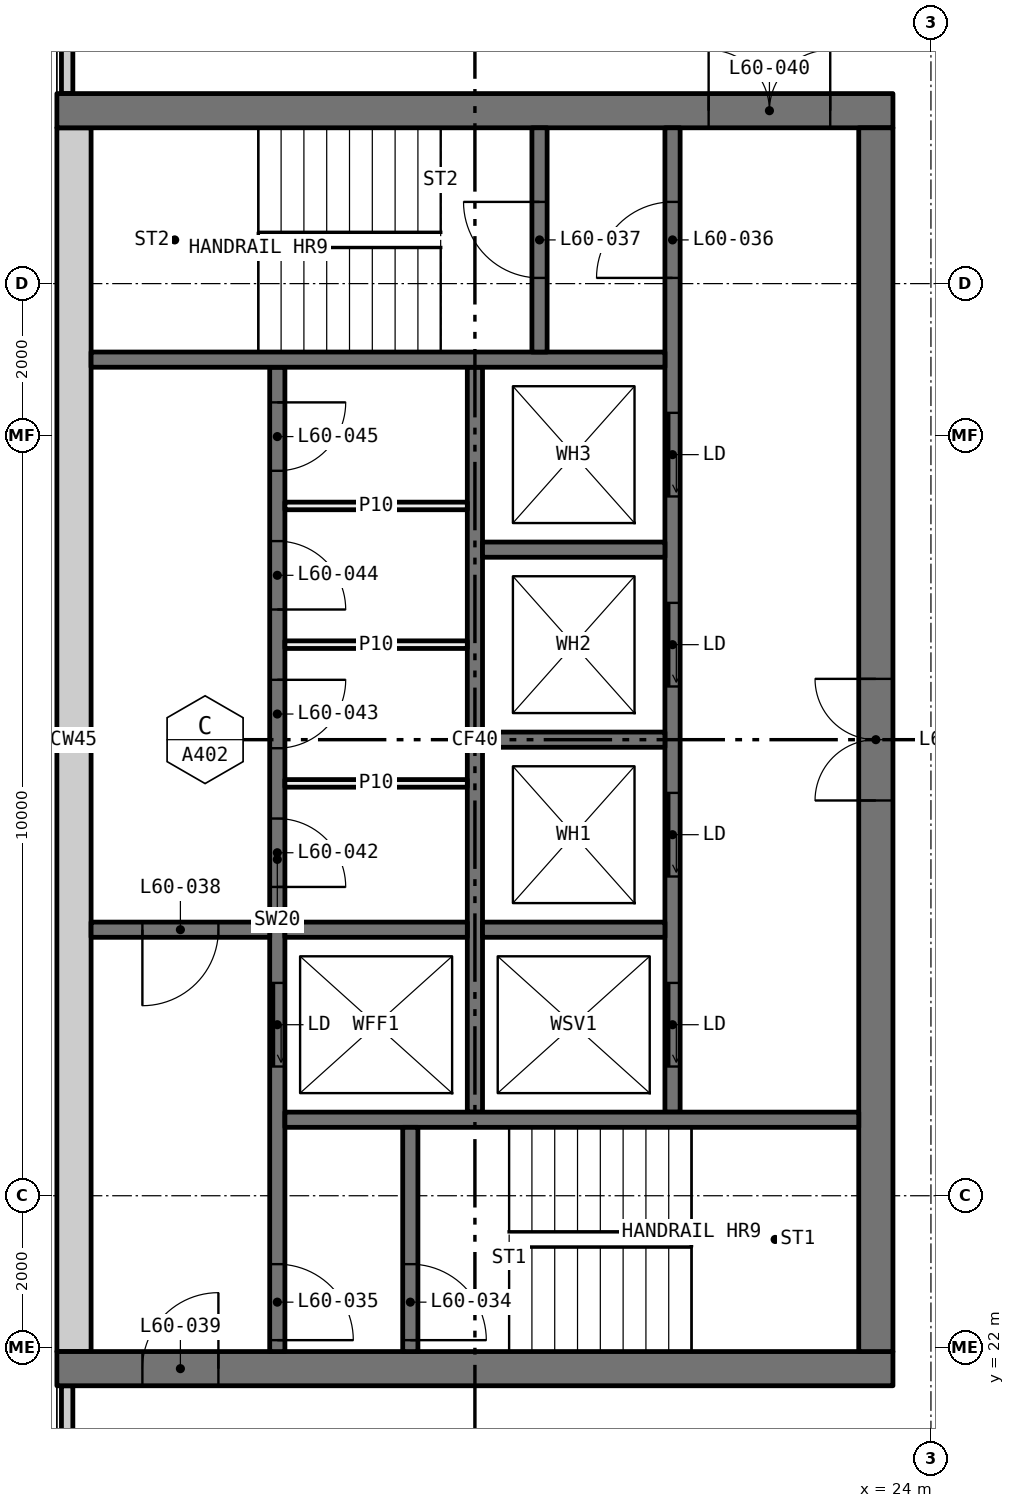
"""IFC4 building model, lengths in metres.
Left out: names, types, materials, properties, quantities, classifications, styles, units other than length and angle.
Written with IfcOpenShell. Run it as: python <this file> out.ifc"""

import sys

from ifc_helpers import new_model, si_unit, direction, frame, frame_2d, origin, place, context, subcontext, project, spatial, rectangle, extrude, element, fill, save


model = new_model("IFC4")
c1 = context("Model", 3, precision=1e-05, world=origin(), true_north=direction((0.0, 1.0)))
c2 = subcontext(c1, "Body", "Model", "MODEL_VIEW")
j1 = project(units=[si_unit("LENGTHUNIT", "METRE"), si_unit("PLANEANGLEUNIT", "RADIAN")], contexts=[c1])
p1 = place(None, origin())
s1 = spatial("IfcSite", under=j1, at=p1, CompositionType="ELEMENT")
p2 = place(p1, origin())
s2 = spatial("IfcBuilding", under=s1, at=p2, CompositionType="ELEMENT")
p3 = place(p2, frame((0.0, 0.0, 224.85)))
s3 = spatial("IfcBuildingStorey", under=s2, at=p3, CompositionType="ELEMENT", Elevation=224.85)
for number, where, z_axis, x_axis in (
    (1, (12.635, 18.71, 0.0), (0.0, 0.0, 1.0), (0.0, 1.0, 0.0)),
    (2, (12.635, 38.5, 0.0), (0.0, 0.0, 1.0), (0.0, 1.0, 0.0)),
):
    element("IfcWall", number, at=place(p3, frame(where, z_axis=z_axis, x_axis=x_axis)), inside=s3, PredefinedType="ELEMENTEDWALL", context=c2, shape_type="SweptSolid", body=[
        extrude(rectangle(XDim=2.79, YDim=0.15, at=frame_2d((1.395, 0.0))), origin(), (0.0, 0.0, 1.0), 3.05),
    ])
p4 = place(p3, frame((12.5, 21.725, 0.0), z_axis=(0.0, 0.0, 1.0), x_axis=(1.0, 0.0, 0.0)))
e3 = element("IfcWall", 3, at=p4, inside=s3, PredefinedType="SHEAR", context=c2, shape_type="SweptSolid", body=[
    extrude(rectangle(XDim=11.0, YDim=0.45, at=frame_2d((5.5, 0.0))), origin(), (0.0, 0.0, 1.0), 3.05),
])
p5 = place(p4, frame((1.125, 0.0, 0.0)))
e4 = element("IfcOpeningElement", 4, at=p5, cuts=e3, PredefinedType="OPENING", context=c2, shape_type="SweptSolid", body=[
    extrude(rectangle(XDim=1.0, YDim=2.1, at=frame_2d((0.5, 1.05))), frame((0.0, 0.235, 0.0), z_axis=(0.0, -1.0, 0.0), x_axis=(1.0, 0.0, 0.0)), (0.0, 0.0, 1.0), 0.47),
])
p6 = place(p3, frame((12.5, 38.275, 0.0), z_axis=(0.0, 0.0, 1.0), x_axis=(1.0, 0.0, 0.0)))
e5 = element("IfcWall", 5, at=p6, inside=s3, PredefinedType="SHEAR", context=c2, shape_type="SweptSolid", body=[
    extrude(rectangle(XDim=11.0, YDim=0.45, at=frame_2d((5.5, 0.0))), origin(), (0.0, 0.0, 1.0), 3.05),
])
p7 = place(p6, frame((8.575, 0.0, 0.0)))
e6 = element("IfcOpeningElement", 6, at=p7, cuts=e5, PredefinedType="OPENING", context=c2, shape_type="SweptSolid", body=[
    extrude(rectangle(XDim=1.6, YDim=2.1, at=frame_2d((0.8, 1.05))), frame((0.0, 0.235, 0.0), z_axis=(0.0, -1.0, 0.0), x_axis=(1.0, 0.0, 0.0)), (0.0, 0.0, 1.0), 0.47),
])
p8 = place(p3, frame((12.725, 21.95, 0.0), z_axis=(0.0, 0.0, 1.0), x_axis=(0.0, 1.0, 0.0)))
e7 = element("IfcWall", 7, at=p8, inside=s3, PredefinedType="SHEAR", context=c2, shape_type="SweptSolid", body=[
    extrude(rectangle(XDim=16.1, YDim=0.45, at=frame_2d((8.05, 0.0))), origin(), (0.0, 0.0, 1.0), 3.05),
])
p9 = place(p3, frame((23.275, 21.95, 0.0), z_axis=(0.0, 0.0, 1.0), x_axis=(0.0, 1.0, 0.0)))
e8 = element("IfcWall", 8, at=p9, inside=s3, PredefinedType="SHEAR", context=c2, shape_type="SweptSolid", body=[
    extrude(rectangle(XDim=16.1, YDim=0.45, at=frame_2d((8.05, 0.0))), origin(), (0.0, 0.0, 1.0), 3.05),
])
p10 = place(p9, frame((7.25, 0.0, 0.0)))
e9 = element("IfcOpeningElement", 9, at=p10, cuts=e8, PredefinedType="OPENING", context=c2, shape_type="SweptSolid", body=[
    extrude(rectangle(XDim=1.6, YDim=2.1, at=frame_2d((0.8, 1.05))), frame((0.0, 0.235, 0.0), z_axis=(0.0, -1.0, 0.0), x_axis=(1.0, 0.0, 0.0)), (0.0, 0.0, 1.0), 0.47),
])
p11 = place(p3, frame((15.4, 21.95, 0.0), z_axis=(0.0, 0.0, 1.0), x_axis=(0.0, 1.0, 0.0)))
e10 = element("IfcWall", 10, at=p11, inside=s3, PredefinedType="SOLIDWALL", context=c2, shape_type="SweptSolid", body=[
    extrude(rectangle(XDim=12.95, YDim=0.2, at=frame_2d((6.475, 0.0))), origin(), (0.0, 0.0, 1.0), 3.05),
])
p12 = place(p11, frame((3.75, 0.0, 0.0)))
e11 = element("IfcOpeningElement", 11, at=p12, cuts=e10, PredefinedType="OPENING", context=c2, shape_type="SweptSolid", body=[
    extrude(rectangle(XDim=1.1, YDim=2.1, at=frame_2d((0.55, 1.05))), frame((0.0, 0.11, 0.0), z_axis=(0.0, -1.0, 0.0), x_axis=(1.0, 0.0, 0.0)), (0.0, 0.0, 1.0), 0.22),
])
p13 = place(p11, frame((0.15, 0.0, 0.0)))
e12 = element("IfcOpeningElement", 12, at=p13, cuts=e10, PredefinedType="OPENING", context=c2, shape_type="SweptSolid", body=[
    extrude(rectangle(XDim=1.0, YDim=2.1, at=frame_2d((0.5, 1.05))), frame((0.0, 0.11, 0.0), z_axis=(0.0, -1.0, 0.0), x_axis=(1.0, 0.0, 0.0)), (0.0, 0.0, 1.0), 0.22),
])
p14 = place(p11, frame((6.113, 0.0, 0.0)))
e13 = element("IfcOpeningElement", 13, at=p14, cuts=e10, PredefinedType="OPENING", context=c2, shape_type="SweptSolid", body=[
    extrude(rectangle(XDim=0.9, YDim=2.1, at=frame_2d((0.45, 1.05))), frame((0.0, 0.11, 0.0), z_axis=(0.0, -1.0, 0.0), x_axis=(1.0, 0.0, 0.0)), (0.0, 0.0, 1.0), 0.22),
])
p15 = place(p11, frame((7.938, 0.0, 0.0)))
e14 = element("IfcOpeningElement", 14, at=p15, cuts=e10, PredefinedType="OPENING", context=c2, shape_type="SweptSolid", body=[
    extrude(rectangle(XDim=0.9, YDim=2.1, at=frame_2d((0.45, 1.05))), frame((0.0, 0.11, 0.0), z_axis=(0.0, -1.0, 0.0), x_axis=(1.0, 0.0, 0.0)), (0.0, 0.0, 1.0), 0.22),
])
p16 = place(p11, frame((9.762, 0.0, 0.0)))
e15 = element("IfcOpeningElement", 15, at=p16, cuts=e10, PredefinedType="OPENING", context=c2, shape_type="SweptSolid", body=[
    extrude(rectangle(XDim=0.9, YDim=2.1, at=frame_2d((0.45, 1.05))), frame((0.0, 0.11, 0.0), z_axis=(0.0, -1.0, 0.0), x_axis=(1.0, 0.0, 0.0)), (0.0, 0.0, 1.0), 0.22),
])
p17 = place(p11, frame((11.587, 0.0, 0.0)))
e16 = element("IfcOpeningElement", 16, at=p17, cuts=e10, PredefinedType="OPENING", context=c2, shape_type="SweptSolid", body=[
    extrude(rectangle(XDim=0.9, YDim=2.1, at=frame_2d((0.45, 1.05))), frame((0.0, 0.11, 0.0), z_axis=(0.0, -1.0, 0.0), x_axis=(1.0, 0.0, 0.0)), (0.0, 0.0, 1.0), 0.22),
])
p18 = place(p3, frame((20.6, 25.1, 0.0), z_axis=(0.0, 0.0, 1.0), x_axis=(0.0, 1.0, 0.0)))
e17 = element("IfcWall", 17, at=p18, inside=s3, PredefinedType="SOLIDWALL", context=c2, shape_type="SweptSolid", body=[
    extrude(rectangle(XDim=12.95, YDim=0.2, at=frame_2d((6.475, 0.0))), origin(), (0.0, 0.0, 1.0), 3.05),
])
p19 = place(p18, frame((0.6, 0.0, 0.0)))
e18 = element("IfcOpeningElement", 18, at=p19, cuts=e17, PredefinedType="OPENING", context=c2, shape_type="SweptSolid", body=[
    extrude(rectangle(XDim=1.1, YDim=2.1, at=frame_2d((0.55, 1.05))), frame((0.0, 0.11, 0.0), z_axis=(0.0, -1.0, 0.0), x_axis=(1.0, 0.0, 0.0)), (0.0, 0.0, 1.0), 0.22),
])
p20 = place(p18, frame((3.1, 0.0, 0.0)))
e19 = element("IfcOpeningElement", 19, at=p20, cuts=e17, PredefinedType="OPENING", context=c2, shape_type="SweptSolid", body=[
    extrude(rectangle(XDim=1.1, YDim=2.1, at=frame_2d((0.55, 1.05))), frame((0.0, 0.11, 0.0), z_axis=(0.0, -1.0, 0.0), x_axis=(1.0, 0.0, 0.0)), (0.0, 0.0, 1.0), 0.22),
])
p21 = place(p18, frame((5.6, 0.0, 0.0)))
e20 = element("IfcOpeningElement", 20, at=p21, cuts=e17, PredefinedType="OPENING", context=c2, shape_type="SweptSolid", body=[
    extrude(rectangle(XDim=1.1, YDim=2.1, at=frame_2d((0.55, 1.05))), frame((0.0, 0.11, 0.0), z_axis=(0.0, -1.0, 0.0), x_axis=(1.0, 0.0, 0.0)), (0.0, 0.0, 1.0), 0.22),
])
p22 = place(p18, frame((8.1, 0.0, 0.0)))
e21 = element("IfcOpeningElement", 21, at=p22, cuts=e17, PredefinedType="OPENING", context=c2, shape_type="SweptSolid", body=[
    extrude(rectangle(XDim=1.1, YDim=2.1, at=frame_2d((0.55, 1.05))), frame((0.0, 0.11, 0.0), z_axis=(0.0, -1.0, 0.0), x_axis=(1.0, 0.0, 0.0)), (0.0, 0.0, 1.0), 0.22),
])
p23 = place(p18, frame((10.975, 0.0, 0.0)))
e22 = element("IfcOpeningElement", 22, at=p23, cuts=e17, PredefinedType="OPENING", context=c2, shape_type="SweptSolid", body=[
    extrude(rectangle(XDim=1.0, YDim=2.1, at=frame_2d((0.5, 1.05))), frame((0.0, 0.11, 0.0), z_axis=(0.0, -1.0, 0.0), x_axis=(1.0, 0.0, 0.0)), (0.0, 0.0, 1.0), 0.22),
])
p24 = place(p3, frame((18.0, 25.1, 0.0), z_axis=(0.0, 0.0, 1.0), x_axis=(0.0, 1.0, 0.0)))
e23 = element("IfcWall", 23, at=p24, inside=s3, PredefinedType="SOLIDWALL", context=c2, shape_type="SweptSolid", body=[
    extrude(rectangle(XDim=9.8, YDim=0.2, at=frame_2d((4.9, 0.0))), origin(), (0.0, 0.0, 1.0), 3.05),
])
for number, where, z_axis, x_axis in (
    (24, (15.5, 25.0, 0.0), (0.0, 0.0, 1.0), (1.0, 0.0, 0.0)),
    (25, (12.95, 35.0, 0.0), (0.0, 0.0, 1.0), (1.0, 0.0, 0.0)),
):
    element("IfcWall", number, at=place(p3, frame(where, z_axis=z_axis, x_axis=x_axis)), inside=s3, PredefinedType="SOLIDWALL", context=c2, shape_type="SweptSolid", body=[
        extrude(rectangle(XDim=7.55, YDim=0.2, at=frame_2d((3.775, 0.0))), origin(), (0.0, 0.0, 1.0), 3.05),
    ])
p25 = place(p3, frame((12.95, 27.5, 0.0), z_axis=(0.0, 0.0, 1.0), x_axis=(1.0, 0.0, 0.0)))
e26 = element("IfcWall", 26, at=p25, inside=s3, PredefinedType="SOLIDWALL", context=c2, shape_type="SweptSolid", body=[
    extrude(rectangle(XDim=2.35, YDim=0.2, at=frame_2d((1.175, 0.0))), origin(), (0.0, 0.0, 1.0), 3.05),
])
p26 = place(p25, frame((0.675, 0.0, 0.0)))
e27 = element("IfcOpeningElement", 27, at=p26, cuts=e26, PredefinedType="OPENING", context=c2, shape_type="SweptSolid", body=[
    extrude(rectangle(XDim=1.0, YDim=2.1, at=frame_2d((0.5, 1.05))), frame((0.0, 0.11, 0.0), z_axis=(0.0, -1.0, 0.0), x_axis=(1.0, 0.0, 0.0)), (0.0, 0.0, 1.0), 0.22),
])
p27 = place(p3, frame((17.15, 21.95, 0.0), z_axis=(0.0, 0.0, 1.0), x_axis=(0.0, 1.0, 0.0)))
e28 = element("IfcWall", 28, at=p27, inside=s3, PredefinedType="SOLIDWALL", context=c2, shape_type="SweptSolid", body=[
    extrude(rectangle(XDim=2.95, YDim=0.2, at=frame_2d((1.475, 0.0))), origin(), (0.0, 0.0, 1.0), 3.05),
])
p28 = place(p27, frame((0.15, 0.0, 0.0)))
e29 = element("IfcOpeningElement", 29, at=p28, cuts=e28, PredefinedType="OPENING", context=c2, shape_type="SweptSolid", body=[
    extrude(rectangle(XDim=1.0, YDim=2.1, at=frame_2d((0.5, 1.05))), frame((0.0, 0.11, 0.0), z_axis=(0.0, -1.0, 0.0), x_axis=(1.0, 0.0, 0.0)), (0.0, 0.0, 1.0), 0.22),
])
p29 = place(p3, frame((18.85, 35.1, 0.0), z_axis=(0.0, 0.0, 1.0), x_axis=(0.0, 1.0, 0.0)))
e30 = element("IfcWall", 30, at=p29, inside=s3, PredefinedType="SOLIDWALL", context=c2, shape_type="SweptSolid", body=[
    extrude(rectangle(XDim=2.95, YDim=0.2, at=frame_2d((1.475, 0.0))), origin(), (0.0, 0.0, 1.0), 3.05),
])
p30 = place(p29, frame((0.975, 0.0, 0.0)))
e31 = element("IfcOpeningElement", 31, at=p30, cuts=e30, PredefinedType="OPENING", context=c2, shape_type="SweptSolid", body=[
    extrude(rectangle(XDim=1.0, YDim=2.1, at=frame_2d((0.5, 1.05))), frame((0.0, 0.11, 0.0), z_axis=(0.0, -1.0, 0.0), x_axis=(1.0, 0.0, 0.0)), (0.0, 0.0, 1.0), 0.22),
])
for number, where, z_axis, x_axis in (
    (32, (15.5, 27.5, 0.0), (0.0, 0.0, 1.0), (1.0, 0.0, 0.0)),
    (33, (18.1, 27.5, 0.0), (0.0, 0.0, 1.0), (1.0, 0.0, 0.0)),
    (34, (18.1, 30.0, 0.0), (0.0, 0.0, 1.0), (1.0, 0.0, 0.0)),
    (35, (18.1, 32.5, 0.0), (0.0, 0.0, 1.0), (1.0, 0.0, 0.0)),
):
    element("IfcWall", number, at=place(p3, frame(where, z_axis=z_axis, x_axis=x_axis)), inside=s3, PredefinedType="SOLIDWALL", context=c2, shape_type="SweptSolid", body=[
        extrude(rectangle(XDim=2.4, YDim=0.2, at=frame_2d((1.2, 0.0))), origin(), (0.0, 0.0, 1.0), 3.05),
    ])
for number, where, z_axis, x_axis in (
    (36, (15.5, 29.425, 0.0), (0.0, 0.0, 1.0), (1.0, 0.0, 0.0)),
    (37, (15.5, 31.25, 0.0), (0.0, 0.0, 1.0), (1.0, 0.0, 0.0)),
    (38, (15.5, 33.075, 0.0), (0.0, 0.0, 1.0), (1.0, 0.0, 0.0)),
):
    element("IfcWall", number, at=place(p3, frame(where, z_axis=z_axis, x_axis=x_axis)), inside=s3, PredefinedType="PARTITIONING", context=c2, shape_type="SweptSolid", body=[
        extrude(rectangle(XDim=2.4, YDim=0.1, at=frame_2d((1.2, 0.0))), origin(), (0.0, 0.0, 1.0), 3.05),
    ])
p31 = place(p19, origin())
e39 = element("IfcDoor", 39, at=p31, inside=s3, OperationType="SLIDING_TO_LEFT", PredefinedType="DOOR", context=c2, shape_type="SweptSolid", body=[
    extrude(rectangle(XDim=1.1, YDim=2.1, at=frame_2d((0.55, 1.05))), frame((0.0, 0.025, 0.0), z_axis=(0.0, -1.0, 0.0), x_axis=(1.0, 0.0, 0.0)), (0.0, 0.0, 1.0), 0.05),
])
fill(e18, e39)
p32 = place(p20, origin())
e40 = element("IfcDoor", 40, at=p32, inside=s3, OperationType="SLIDING_TO_LEFT", PredefinedType="DOOR", context=c2, shape_type="SweptSolid", body=[
    extrude(rectangle(XDim=1.1, YDim=2.1, at=frame_2d((0.55, 1.05))), frame((0.0, 0.025, 0.0), z_axis=(0.0, -1.0, 0.0), x_axis=(1.0, 0.0, 0.0)), (0.0, 0.0, 1.0), 0.05),
])
fill(e19, e40)
p33 = place(p21, origin())
e41 = element("IfcDoor", 41, at=p33, inside=s3, OperationType="SLIDING_TO_LEFT", PredefinedType="DOOR", context=c2, shape_type="SweptSolid", body=[
    extrude(rectangle(XDim=1.1, YDim=2.1, at=frame_2d((0.55, 1.05))), frame((0.0, 0.025, 0.0), z_axis=(0.0, -1.0, 0.0), x_axis=(1.0, 0.0, 0.0)), (0.0, 0.0, 1.0), 0.05),
])
fill(e20, e41)
p34 = place(p22, origin())
e42 = element("IfcDoor", 42, at=p34, inside=s3, OperationType="SLIDING_TO_LEFT", PredefinedType="DOOR", context=c2, shape_type="SweptSolid", body=[
    extrude(rectangle(XDim=1.1, YDim=2.1, at=frame_2d((0.55, 1.05))), frame((0.0, 0.025, 0.0), z_axis=(0.0, -1.0, 0.0), x_axis=(1.0, 0.0, 0.0)), (0.0, 0.0, 1.0), 0.05),
])
fill(e21, e42)
p35 = place(p12, origin())
e43 = element("IfcDoor", 43, at=p35, inside=s3, OperationType="SLIDING_TO_LEFT", PredefinedType="DOOR", context=c2, shape_type="SweptSolid", body=[
    extrude(rectangle(XDim=1.1, YDim=2.1, at=frame_2d((0.55, 1.05))), frame((0.0, 0.025, 0.0), z_axis=(0.0, -1.0, 0.0), x_axis=(1.0, 0.0, 0.0)), (0.0, 0.0, 1.0), 0.05),
])
fill(e11, e43)
p36 = place(p28, frame((1.0, 0.0, 0.0), x_axis=(-1.0, 0.0, 0.0)))
e44 = element("IfcDoor", 44, at=p36, inside=s3, OperationType="SINGLE_SWING_LEFT", PredefinedType="DOOR", context=c2, shape_type="SweptSolid", body=[
    extrude(rectangle(XDim=1.0, YDim=2.1, at=frame_2d((0.5, 1.05))), frame((0.0, 0.025, 0.0), z_axis=(0.0, -1.0, 0.0), x_axis=(1.0, 0.0, 0.0)), (0.0, 0.0, 1.0), 0.05),
])
fill(e29, e44)
p37 = place(p13, frame((1.0, 0.0, 0.0), x_axis=(-1.0, 0.0, 0.0)))
e45 = element("IfcDoor", 45, at=p37, inside=s3, OperationType="SINGLE_SWING_LEFT", PredefinedType="DOOR", context=c2, shape_type="SweptSolid", body=[
    extrude(rectangle(XDim=1.0, YDim=2.1, at=frame_2d((0.5, 1.05))), frame((0.0, 0.025, 0.0), z_axis=(0.0, -1.0, 0.0), x_axis=(1.0, 0.0, 0.0)), (0.0, 0.0, 1.0), 0.05),
])
fill(e12, e45)
p38 = place(p23, origin())
e46 = element("IfcDoor", 46, at=p38, inside=s3, OperationType="SINGLE_SWING_RIGHT", PredefinedType="DOOR", context=c2, shape_type="SweptSolid", body=[
    extrude(rectangle(XDim=1.0, YDim=2.1, at=frame_2d((0.5, 1.05))), frame((0.0, 0.025, 0.0), z_axis=(0.0, -1.0, 0.0), x_axis=(1.0, 0.0, 0.0)), (0.0, 0.0, 1.0), 0.05),
])
fill(e22, e46)
p39 = place(p30, origin())
e47 = element("IfcDoor", 47, at=p39, inside=s3, OperationType="SINGLE_SWING_LEFT", PredefinedType="DOOR", context=c2, shape_type="SweptSolid", body=[
    extrude(rectangle(XDim=1.0, YDim=2.1, at=frame_2d((0.5, 1.05))), frame((0.0, 0.025, 0.0), z_axis=(0.0, -1.0, 0.0), x_axis=(1.0, 0.0, 0.0)), (0.0, 0.0, 1.0), 0.05),
])
fill(e31, e47)
p40 = place(p26, frame((1.0, 0.0, 0.0), x_axis=(-1.0, 0.0, 0.0)))
e48 = element("IfcDoor", 48, at=p40, inside=s3, OperationType="SINGLE_SWING_LEFT", PredefinedType="DOOR", context=c2, shape_type="SweptSolid", body=[
    extrude(rectangle(XDim=1.0, YDim=2.1, at=frame_2d((0.5, 1.05))), frame((0.0, 0.025, 0.0), z_axis=(0.0, -1.0, 0.0), x_axis=(1.0, 0.0, 0.0)), (0.0, 0.0, 1.0), 0.05),
])
fill(e27, e48)
p41 = place(p5, origin())
e49 = element("IfcDoor", 49, at=p41, inside=s3, OperationType="SINGLE_SWING_LEFT", PredefinedType="DOOR", context=c2, shape_type="SweptSolid", body=[
    extrude(rectangle(XDim=1.0, YDim=2.1, at=frame_2d((0.5, 1.05))), frame((0.0, 0.025, 0.0), z_axis=(0.0, -1.0, 0.0), x_axis=(1.0, 0.0, 0.0)), (0.0, 0.0, 1.0), 0.05),
])
fill(e4, e49)
p42 = place(p7, origin())
e50 = element("IfcDoor", 50, at=p42, inside=s3, OperationType="DOUBLE_DOOR_SINGLE_SWING", PredefinedType="DOOR", context=c2, shape_type="SweptSolid", body=[
    extrude(rectangle(XDim=1.6, YDim=2.1, at=frame_2d((0.8, 1.05))), frame((0.0, 0.025, 0.0), z_axis=(0.0, -1.0, 0.0), x_axis=(1.0, 0.0, 0.0)), (0.0, 0.0, 1.0), 0.05),
])
fill(e6, e50)
p43 = place(p10, origin())
e51 = element("IfcDoor", 51, at=p43, inside=s3, OperationType="DOUBLE_DOOR_SINGLE_SWING", PredefinedType="DOOR", context=c2, shape_type="SweptSolid", body=[
    extrude(rectangle(XDim=1.6, YDim=2.1, at=frame_2d((0.8, 1.05))), frame((0.0, 0.025, 0.0), z_axis=(0.0, -1.0, 0.0), x_axis=(1.0, 0.0, 0.0)), (0.0, 0.0, 1.0), 0.05),
])
fill(e9, e51)
p44 = place(p14, frame((0.9, 0.0, 0.0), x_axis=(-1.0, 0.0, 0.0)))
e52 = element("IfcDoor", 52, at=p44, inside=s3, OperationType="SINGLE_SWING_LEFT", PredefinedType="DOOR", context=c2, shape_type="SweptSolid", body=[
    extrude(rectangle(XDim=0.9, YDim=2.1, at=frame_2d((0.45, 1.05))), frame((0.0, 0.025, 0.0), z_axis=(0.0, -1.0, 0.0), x_axis=(1.0, 0.0, 0.0)), (0.0, 0.0, 1.0), 0.05),
])
fill(e13, e52)
p45 = place(p15, frame((0.9, 0.0, 0.0), x_axis=(-1.0, 0.0, 0.0)))
e53 = element("IfcDoor", 53, at=p45, inside=s3, OperationType="SINGLE_SWING_RIGHT", PredefinedType="DOOR", context=c2, shape_type="SweptSolid", body=[
    extrude(rectangle(XDim=0.9, YDim=2.1, at=frame_2d((0.45, 1.05))), frame((0.0, 0.025, 0.0), z_axis=(0.0, -1.0, 0.0), x_axis=(1.0, 0.0, 0.0)), (0.0, 0.0, 1.0), 0.05),
])
fill(e14, e53)
p46 = place(p16, frame((0.9, 0.0, 0.0), x_axis=(-1.0, 0.0, 0.0)))
e54 = element("IfcDoor", 54, at=p46, inside=s3, OperationType="SINGLE_SWING_LEFT", PredefinedType="DOOR", context=c2, shape_type="SweptSolid", body=[
    extrude(rectangle(XDim=0.9, YDim=2.1, at=frame_2d((0.45, 1.05))), frame((0.0, 0.025, 0.0), z_axis=(0.0, -1.0, 0.0), x_axis=(1.0, 0.0, 0.0)), (0.0, 0.0, 1.0), 0.05),
])
fill(e15, e54)
p47 = place(p17, frame((0.9, 0.0, 0.0), x_axis=(-1.0, 0.0, 0.0)))
e55 = element("IfcDoor", 55, at=p47, inside=s3, OperationType="SINGLE_SWING_RIGHT", PredefinedType="DOOR", context=c2, shape_type="SweptSolid", body=[
    extrude(rectangle(XDim=0.9, YDim=2.1, at=frame_2d((0.45, 1.05))), frame((0.0, 0.025, 0.0), z_axis=(0.0, -1.0, 0.0), x_axis=(1.0, 0.0, 0.0)), (0.0, 0.0, 1.0), 0.05),
])
fill(e16, e55)
save(model, sys.argv[1])
